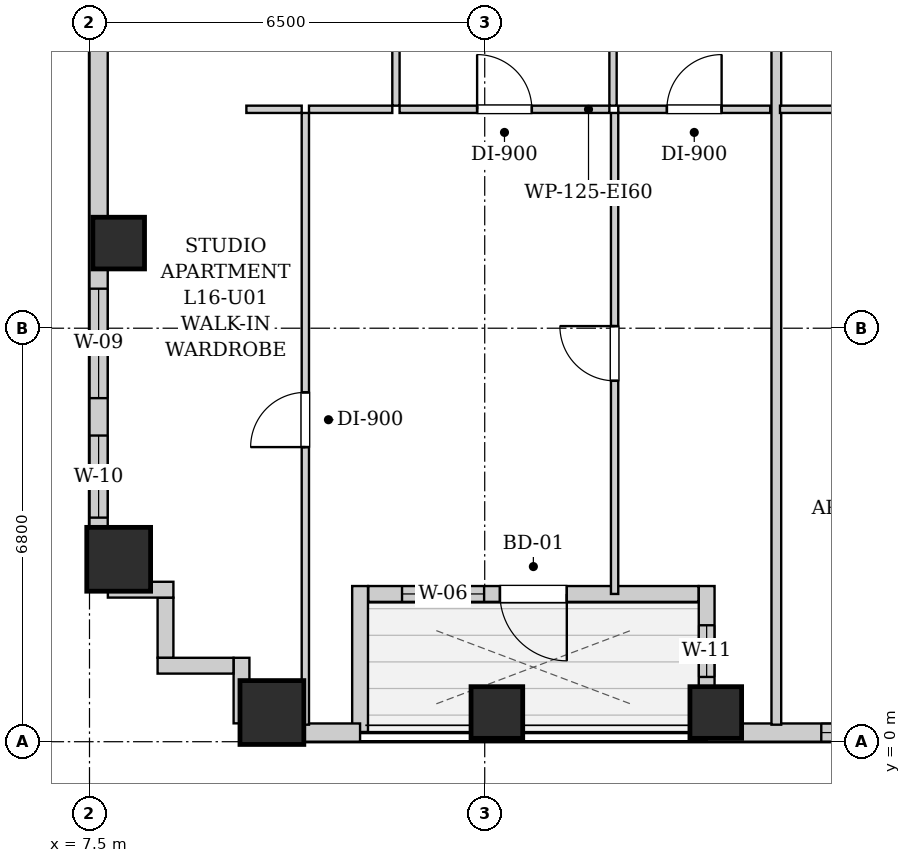
"""IFC4 building model, lengths in metres.
Left out: names, types, materials, properties, quantities, classifications, styles, units other than length and angle.
Written with IfcOpenShell. Run it as: python <this file> out.ifc"""

import sys

from ifc_helpers import new_model, si_unit, direction, frame, frame_2d, origin, origin_2d, place, context, subcontext, project, spatial, rectangle, extrude, element, fill, save


model = new_model("IFC4")
c1 = context("Model", 3, precision=1e-05, world=origin(), true_north=direction((0.0, 1.0)))
c2 = subcontext(c1, "Body", "Model", "MODEL_VIEW")
j1 = project(units=[si_unit("LENGTHUNIT", "METRE"), si_unit("PLANEANGLEUNIT", "RADIAN")], contexts=[c1])
p1 = place(None, origin())
s1 = spatial("IfcSite", under=j1, at=p1, CompositionType="ELEMENT")
p2 = place(p1, origin())
s2 = spatial("IfcBuilding", under=s1, at=p2, CompositionType="ELEMENT")
p3 = place(p2, frame((0.0, 0.0, 61.0)))
s3 = spatial("IfcBuildingStorey", under=s2, at=p3, CompositionType="ELEMENT", Elevation=61.0)
p4 = place(p3, frame((10.5, 0.48, 0.0), z_axis=(0.0, 0.0, 1.0), x_axis=(1.0, 0.0, 0.0)))
e1 = element("IfcColumn", 1, at=p4, inside=s3, PredefinedType="COLUMN", context=c2, shape_type="SweptSolid", body=[
    extrude(rectangle(XDim=1.05, YDim=1.05, at=origin_2d()), origin(), (0.0, 0.0, 1.0), 3.2),
])
for number, where, z_axis, x_axis in (
    (2, (14.2, 0.48, 0.0), (0.0, 0.0, 1.0), (1.0, 0.0, 0.0)),
    (3, (17.8, 0.48, 0.0), (0.0, 0.0, 1.0), (1.0, 0.0, 0.0)),
):
    element("IfcColumn", number, at=place(p3, frame(where, z_axis=z_axis, x_axis=x_axis)), inside=s3, PredefinedType="COLUMN", context=c2, shape_type="SweptSolid", body=[
        extrude(rectangle(XDim=0.85, YDim=0.85, at=origin_2d()), origin(), (0.0, 0.0, 1.0), 3.2),
    ])
p5 = place(p3, frame((7.98, 3.0, 0.0), z_axis=(0.0, 0.0, 1.0), x_axis=(1.0, 0.0, 0.0)))
e4 = element("IfcColumn", 4, at=p5, inside=s3, PredefinedType="COLUMN", context=c2, shape_type="SweptSolid", body=[
    extrude(rectangle(XDim=1.05, YDim=1.05, at=origin_2d()), origin(), (0.0, 0.0, 1.0), 3.2),
])
p6 = place(p3, frame((7.98, 8.2, 0.0), z_axis=(0.0, 0.0, 1.0), x_axis=(1.0, 0.0, 0.0)))
e5 = element("IfcColumn", 5, at=p6, inside=s3, PredefinedType="COLUMN", context=c2, shape_type="SweptSolid", body=[
    extrude(rectangle(XDim=0.85, YDim=0.85, at=origin_2d()), origin(), (0.0, 0.0, 1.0), 3.2),
])
p7 = place(p3, frame((44.0, 0.15, 0.0), z_axis=(0.0, 0.0, 1.0), x_axis=(-1.0, 0.0, 0.0)))
e6 = element("IfcWall", 6, at=p7, inside=s3, PredefinedType="SOLIDWALL", context=c2, shape_type="SweptSolid", body=[
    extrude(rectangle(XDim=26.35, YDim=0.3, at=frame_2d((13.175, 0.0))), origin(), (0.0, 0.0, 1.0), 1.975),
])
p8 = place(p7, frame((22.665, 0.0, 0.55)))
e7 = element("IfcOpeningElement", 7, at=p8, cuts=e6, PredefinedType="OPENING", context=c2, shape_type="SweptSolid", body=[
    extrude(rectangle(XDim=1.8, YDim=1.2, at=frame_2d((0.9, 0.6))), frame((0.0, 0.16, 0.0), z_axis=(0.0, -1.0, 0.0), x_axis=(1.0, 0.0, 0.0)), (0.0, 0.0, 1.0), 0.32),
])
p9 = place(p7, frame((15.82, 0.0, 0.55)))
e8 = element("IfcOpeningElement", 8, at=p9, cuts=e6, PredefinedType="OPENING", context=c2, shape_type="SweptSolid", body=[
    extrude(rectangle(XDim=0.68, YDim=1.2, at=frame_2d((0.34, 0.6))), frame((0.0, 0.16, 0.0), z_axis=(0.0, -1.0, 0.0), x_axis=(1.0, 0.0, 0.0)), (0.0, 0.0, 1.0), 0.32),
])
p10 = place(p7, frame((13.027, 0.0, 0.55)))
e9 = element("IfcOpeningElement", 9, at=p10, cuts=e6, PredefinedType="OPENING", context=c2, shape_type="SweptSolid", body=[
    extrude(rectangle(XDim=1.8, YDim=1.2, at=frame_2d((0.9, 0.6))), frame((0.0, 0.16, 0.0), z_axis=(0.0, -1.0, 0.0), x_axis=(1.0, 0.0, 0.0)), (0.0, 0.0, 1.0), 0.32),
])
p11 = place(p7, frame((9.365, 0.0, 0.55)))
e10 = element("IfcOpeningElement", 10, at=p11, cuts=e6, PredefinedType="OPENING", context=c2, shape_type="SweptSolid", body=[
    extrude(rectangle(XDim=0.85, YDim=1.2, at=frame_2d((0.425, 0.6))), frame((0.0, 0.16, 0.0), z_axis=(0.0, -1.0, 0.0), x_axis=(1.0, 0.0, 0.0)), (0.0, 0.0, 1.0), 0.32),
])
p12 = place(p7, frame((6.553, 0.0, 0.55)))
e11 = element("IfcOpeningElement", 11, at=p12, cuts=e6, PredefinedType="OPENING", context=c2, shape_type="SweptSolid", body=[
    extrude(rectangle(XDim=1.8, YDim=1.2, at=frame_2d((0.9, 0.6))), frame((0.0, 0.16, 0.0), z_axis=(0.0, -1.0, 0.0), x_axis=(1.0, 0.0, 0.0)), (0.0, 0.0, 1.0), 0.32),
])
p13 = place(p7, frame((2.262, 0.0, 0.55)))
e12 = element("IfcOpeningElement", 12, at=p13, cuts=e6, PredefinedType="OPENING", context=c2, shape_type="SweptSolid", body=[
    extrude(rectangle(XDim=1.8, YDim=1.2, at=frame_2d((0.9, 0.6))), frame((0.0, 0.16, 0.0), z_axis=(0.0, -1.0, 0.0), x_axis=(1.0, 0.0, 0.0)), (0.0, 0.0, 1.0), 0.32),
])
p14 = place(p3, frame((17.65, 0.16, 0.0), z_axis=(0.0, 0.0, 1.0), x_axis=(0.0, 1.0, 0.0)))
e13 = element("IfcWall", 13, at=p14, inside=s3, PredefinedType="SOLIDWALL", context=c2, shape_type="SweptSolid", body=[
    extrude(rectangle(XDim=2.4, YDim=0.26, at=frame_2d((1.2, 0.0))), origin(), (0.0, 0.0, 1.0), 2.94),
])
p15 = place(p14, frame((0.905, 0.0, 0.55)))
e14 = element("IfcOpeningElement", 14, at=p15, cuts=e13, PredefinedType="OPENING", context=c2, shape_type="SweptSolid", body=[
    extrude(rectangle(XDim=0.85, YDim=1.2, at=frame_2d((0.425, 0.6))), frame((0.0, 0.14, 0.0), z_axis=(0.0, -1.0, 0.0), x_axis=(1.0, 0.0, 0.0)), (0.0, 0.0, 1.0), 0.28),
])
p16 = place(p3, frame((17.516, 2.43, 0.0), z_axis=(0.0, 0.0, 1.0), x_axis=(-1.0, 0.0, 0.0)))
e15 = element("IfcWall", 15, at=p16, inside=s3, PredefinedType="SOLIDWALL", context=c2, shape_type="SweptSolid", body=[
    extrude(rectangle(XDim=5.432, YDim=0.26, at=frame_2d((2.716, 0.0))), origin(), (0.0, 0.0, 1.0), 2.94),
])
p17 = place(p16, frame((2.166, 0.0, 0.0)))
e16 = element("IfcOpeningElement", 16, at=p17, cuts=e15, PredefinedType="OPENING", context=c2, shape_type="SweptSolid", body=[
    extrude(rectangle(XDim=1.1, YDim=2.0, at=frame_2d((0.55, 1.0))), frame((0.0, 0.14, 0.0), z_axis=(0.0, -1.0, 0.0), x_axis=(1.0, 0.0, 0.0)), (0.0, 0.0, 1.0), 0.28),
])
p18 = place(p16, frame((3.526, 0.0, 0.85)))
e17 = element("IfcOpeningElement", 17, at=p18, cuts=e15, PredefinedType="OPENING", context=c2, shape_type="SweptSolid", body=[
    extrude(rectangle(XDim=1.35, YDim=1.65, at=frame_2d((0.675, 0.825))), frame((0.0, 0.14, 0.0), z_axis=(0.0, -1.0, 0.0), x_axis=(1.0, 0.0, 0.0)), (0.0, 0.0, 1.0), 0.28),
])
p19 = place(p3, frame((11.95, 2.56, 0.0), z_axis=(0.0, 0.0, 1.0), x_axis=(0.0, -1.0, 0.0)))
e18 = element("IfcWall", 18, at=p19, inside=s3, PredefinedType="SOLIDWALL", context=c2, shape_type="SweptSolid", body=[
    extrude(rectangle(XDim=2.4, YDim=0.26, at=frame_2d((1.2, 0.0))), origin(), (0.0, 0.0, 1.0), 2.94),
])
p20 = place(p3, frame((11.95, 0.15, 0.0), z_axis=(0.0, 0.0, 1.0), x_axis=(-1.0, 0.0, 0.0)))
e19 = element("IfcWall", 19, at=p20, inside=s3, PredefinedType="SOLIDWALL", context=c2, shape_type="SweptSolid", body=[
    extrude(rectangle(XDim=1.95, YDim=0.3, at=frame_2d((0.975, 0.0))), origin(), (0.0, 0.0, 1.0), 1.975),
])
p21 = place(p3, frame((7.65, 2.5, 0.0), z_axis=(0.0, 0.0, 1.0), x_axis=(0.0, 1.0, 0.0)))
e20 = element("IfcWall", 20, at=p21, inside=s3, PredefinedType="SOLIDWALL", context=c2, shape_type="SweptSolid", body=[
    extrude(rectangle(XDim=42.6, YDim=0.3, at=frame_2d((21.3, 0.0))), origin(), (0.0, 0.0, 1.0), 1.975),
])
p22 = place(p21, frame((3.15, 0.0, 0.55)))
e21 = element("IfcOpeningElement", 21, at=p22, cuts=e20, PredefinedType="OPENING", context=c2, shape_type="SweptSolid", body=[
    extrude(rectangle(XDim=1.8, YDim=1.2, at=frame_2d((0.9, 0.6))), frame((0.0, 0.16, 0.0), z_axis=(0.0, -1.0, 0.0), x_axis=(1.0, 0.0, 0.0)), (0.0, 0.0, 1.0), 0.32),
])
p23 = place(p21, frame((1.185, 0.0, 0.55)))
e22 = element("IfcOpeningElement", 22, at=p23, cuts=e20, PredefinedType="OPENING", context=c2, shape_type="SweptSolid", body=[
    extrude(rectangle(XDim=1.35, YDim=1.2, at=frame_2d((0.675, 0.6))), frame((0.0, 0.16, 0.0), z_axis=(0.0, -1.0, 0.0), x_axis=(1.0, 0.0, 0.0)), (0.0, 0.0, 1.0), 0.32),
])
p24 = place(p21, frame((37.085, 0.0, 0.55)))
e23 = element("IfcOpeningElement", 23, at=p24, cuts=e20, PredefinedType="OPENING", context=c2, shape_type="SweptSolid", body=[
    extrude(rectangle(XDim=1.8, YDim=1.2, at=frame_2d((0.9, 0.6))), frame((0.0, 0.16, 0.0), z_axis=(0.0, -1.0, 0.0), x_axis=(1.0, 0.0, 0.0)), (0.0, 0.0, 1.0), 0.32),
])
p25 = place(p21, frame((31.55, 0.0, 0.55)))
e24 = element("IfcOpeningElement", 24, at=p25, cuts=e20, PredefinedType="OPENING", context=c2, shape_type="SweptSolid", body=[
    extrude(rectangle(XDim=1.35, YDim=1.2, at=frame_2d((0.675, 0.6))), frame((0.0, 0.16, 0.0), z_axis=(0.0, -1.0, 0.0), x_axis=(1.0, 0.0, 0.0)), (0.0, 0.0, 1.0), 0.32),
])
p26 = place(p21, frame((15.2, 0.0, 0.55)))
e25 = element("IfcOpeningElement", 25, at=p26, cuts=e20, PredefinedType="OPENING", context=c2, shape_type="SweptSolid", body=[
    extrude(rectangle(XDim=1.8, YDim=1.2, at=frame_2d((0.9, 0.6))), frame((0.0, 0.16, 0.0), z_axis=(0.0, -1.0, 0.0), x_axis=(1.0, 0.0, 0.0)), (0.0, 0.0, 1.0), 0.32),
])
p27 = place(p21, frame((13.085, 0.0, 0.55)))
e26 = element("IfcOpeningElement", 26, at=p27, cuts=e20, PredefinedType="OPENING", context=c2, shape_type="SweptSolid", body=[
    extrude(rectangle(XDim=1.35, YDim=1.2, at=frame_2d((0.675, 0.6))), frame((0.0, 0.16, 0.0), z_axis=(0.0, -1.0, 0.0), x_axis=(1.0, 0.0, 0.0)), (0.0, 0.0, 1.0), 0.32),
])
p28 = place(p21, frame((22.575, 0.0, 0.55)))
e27 = element("IfcOpeningElement", 27, at=p28, cuts=e20, PredefinedType="OPENING", context=c2, shape_type="SweptSolid", body=[
    extrude(rectangle(XDim=1.8, YDim=1.2, at=frame_2d((0.9, 0.6))), frame((0.0, 0.16, 0.0), z_axis=(0.0, -1.0, 0.0), x_axis=(1.0, 0.0, 0.0)), (0.0, 0.0, 1.0), 0.32),
])
p29 = place(p3, frame((10.0, 0.302, 0.0), z_axis=(0.0, 0.0, 1.0), x_axis=(0.0, 1.0, 0.0)))
e28 = element("IfcWall", 28, at=p29, inside=s3, PredefinedType="SOLIDWALL", context=c2, shape_type="SweptSolid", body=[
    extrude(rectangle(XDim=1.078, YDim=0.26, at=frame_2d((0.539, 0.0))), origin(), (0.0, 0.0, 1.0), 2.94),
])
p30 = place(p3, frame((9.868, 1.25, 0.0), z_axis=(0.0, 0.0, 1.0), x_axis=(-1.0, 0.0, 0.0)))
e29 = element("IfcWall", 29, at=p30, inside=s3, PredefinedType="SOLIDWALL", context=c2, shape_type="SweptSolid", body=[
    extrude(rectangle(XDim=1.248, YDim=0.26, at=frame_2d((0.624, 0.0))), origin(), (0.0, 0.0, 1.0), 2.94),
])
p31 = place(p3, frame((8.75, 1.382, 0.0), z_axis=(0.0, 0.0, 1.0), x_axis=(0.0, 1.0, 0.0)))
e30 = element("IfcWall", 30, at=p31, inside=s3, PredefinedType="SOLIDWALL", context=c2, shape_type="SweptSolid", body=[
    extrude(rectangle(XDim=0.986, YDim=0.26, at=frame_2d((0.493, 0.0))), origin(), (0.0, 0.0, 1.0), 2.94),
])
p32 = place(p3, frame((8.88, 2.5, 0.0), z_axis=(0.0, 0.0, 1.0), x_axis=(-1.0, 0.0, 0.0)))
e31 = element("IfcWall", 31, at=p32, inside=s3, PredefinedType="SOLIDWALL", context=c2, shape_type="SweptSolid", body=[
    extrude(rectangle(XDim=1.078, YDim=0.26, at=frame_2d((0.539, 0.0))), origin(), (0.0, 0.0, 1.0), 2.94),
])
p33 = place(p3, frame((12.54, 10.46, 0.0), z_axis=(0.0, 0.0, 1.0), x_axis=(0.0, 1.0, 0.0)))
e32 = element("IfcWall", 32, at=p33, inside=s3, PredefinedType="PARTITIONING", context=c2, shape_type="SweptSolid", body=[
    extrude(rectangle(XDim=2.85, YDim=0.12, at=frame_2d((1.425, 0.0))), origin(), (0.0, 0.0, 1.0), 2.94),
])
p34 = place(p33, frame((0.995, 0.0, 0.0)))
e33 = element("IfcOpeningElement", 33, at=p34, cuts=e32, PredefinedType="OPENING", context=c2, shape_type="SweptSolid", body=[
    extrude(rectangle(XDim=0.86, YDim=2.05, at=frame_2d((0.43, 1.025))), frame((0.0, 0.07, 0.0), z_axis=(0.0, -1.0, 0.0), x_axis=(1.0, 0.0, 0.0)), (0.0, 0.0, 1.0), 0.14),
])
p35 = place(p3, frame((10.08, 10.4, 0.0), z_axis=(0.0, 0.0, 1.0), x_axis=(1.0, 0.0, 0.0)))
e34 = element("IfcWall", 34, at=p35, inside=s3, PredefinedType="PARTITIONING", context=c2, shape_type="SweptSolid", body=[
    extrude(rectangle(XDim=0.91, YDim=0.12, at=frame_2d((0.455, 0.0))), origin(), (0.0, 0.0, 1.0), 2.94),
])
p36 = place(p3, frame((11.11, 10.4, 0.0), z_axis=(0.0, 0.0, 1.0), x_axis=(1.0, 0.0, 0.0)))
e35 = element("IfcWall", 35, at=p36, inside=s3, PredefinedType="PARTITIONING", context=c2, shape_type="SweptSolid", body=[
    extrude(rectangle(XDim=1.37, YDim=0.12, at=frame_2d((0.685, 0.0))), origin(), (0.0, 0.0, 1.0), 2.94),
])
p37 = place(p3, frame((16.11, 10.46, 0.0), z_axis=(0.0, 0.0, 1.0), x_axis=(0.0, 1.0, 0.0)))
e36 = element("IfcWall", 36, at=p37, inside=s3, PredefinedType="PARTITIONING", context=c2, shape_type="SweptSolid", body=[
    extrude(rectangle(XDim=2.85, YDim=0.12, at=frame_2d((1.425, 0.0))), origin(), (0.0, 0.0, 1.0), 2.94),
])
p38 = place(p37, frame((0.975, 0.0, 0.0)))
e37 = element("IfcOpeningElement", 37, at=p38, cuts=e36, PredefinedType="OPENING", context=c2, shape_type="SweptSolid", body=[
    extrude(rectangle(XDim=0.9, YDim=2.05, at=frame_2d((0.45, 1.025))), frame((0.0, 0.07, 0.0), z_axis=(0.0, -1.0, 0.0), x_axis=(1.0, 0.0, 0.0)), (0.0, 0.0, 1.0), 0.14),
])
p39 = place(p3, frame((12.6, 10.4, 0.0), z_axis=(0.0, 0.0, 1.0), x_axis=(1.0, 0.0, 0.0)))
e38 = element("IfcWall", 38, at=p39, inside=s3, PredefinedType="PARTITIONING", context=c2, shape_type="SweptSolid", body=[
    extrude(rectangle(XDim=3.45, YDim=0.12, at=frame_2d((1.725, 0.0))), origin(), (0.0, 0.0, 1.0), 2.94),
])
p40 = place(p39, frame((1.275, 0.0, 0.0)))
e39 = element("IfcOpeningElement", 39, at=p40, cuts=e38, PredefinedType="OPENING", context=c2, shape_type="SweptSolid", body=[
    extrude(rectangle(XDim=0.9, YDim=2.05, at=frame_2d((0.45, 1.025))), frame((0.0, 0.07, 0.0), z_axis=(0.0, -1.0, 0.0), x_axis=(1.0, 0.0, 0.0)), (0.0, 0.0, 1.0), 0.14),
])
p41 = place(p3, frame((16.196, 10.4, 0.0), z_axis=(0.0, 0.0, 1.0), x_axis=(1.0, 0.0, 0.0)))
e40 = element("IfcWall", 40, at=p41, inside=s3, PredefinedType="PARTITIONING", context=c2, shape_type="SweptSolid", body=[
    extrude(rectangle(XDim=2.5, YDim=0.12, at=frame_2d((1.25, 0.0))), origin(), (0.0, 0.0, 1.0), 2.94),
])
p42 = place(p41, frame((0.8, 0.0, 0.0)))
e41 = element("IfcOpeningElement", 41, at=p42, cuts=e40, PredefinedType="OPENING", context=c2, shape_type="SweptSolid", body=[
    extrude(rectangle(XDim=0.9, YDim=2.05, at=frame_2d((0.45, 1.025))), frame((0.0, 0.07, 0.0), z_axis=(0.0, -1.0, 0.0), x_axis=(1.0, 0.0, 0.0)), (0.0, 0.0, 1.0), 0.14),
])
p43 = place(p3, frame((11.05, 0.28, 0.0), z_axis=(0.0, 0.0, 1.0), x_axis=(0.0, 1.0, 0.0)))
e42 = element("IfcWall", 42, at=p43, inside=s3, PredefinedType="PARTITIONING", context=c2, shape_type="SweptSolid", body=[
    extrude(rectangle(XDim=10.06, YDim=0.12, at=frame_2d((5.03, 0.0))), origin(), (0.0, 0.0, 1.0), 2.94),
])
p44 = place(p43, frame((4.565, 0.0, 0.0)))
e43 = element("IfcOpeningElement", 43, at=p44, cuts=e42, PredefinedType="OPENING", context=c2, shape_type="SweptSolid", body=[
    extrude(rectangle(XDim=0.9, YDim=2.05, at=frame_2d((0.45, 1.025))), frame((0.0, 0.07, 0.0), z_axis=(0.0, -1.0, 0.0), x_axis=(1.0, 0.0, 0.0)), (0.0, 0.0, 1.0), 0.14),
])
p45 = place(p3, frame((16.136, 2.43, 0.0), z_axis=(0.0, 0.0, 1.0), x_axis=(0.0, 1.0, 0.0)))
e44 = element("IfcWall", 44, at=p45, inside=s3, PredefinedType="PARTITIONING", context=c2, shape_type="SweptSolid", body=[
    extrude(rectangle(XDim=7.91, YDim=0.12, at=frame_2d((3.955, 0.0))), origin(), (0.0, 0.0, 1.0), 2.94),
])
p46 = place(p45, frame((3.505, 0.0, 0.0)))
e45 = element("IfcOpeningElement", 45, at=p46, cuts=e44, PredefinedType="OPENING", context=c2, shape_type="SweptSolid", body=[
    extrude(rectangle(XDim=0.9, YDim=2.05, at=frame_2d((0.45, 1.025))), frame((0.0, 0.07, 0.0), z_axis=(0.0, -1.0, 0.0), x_axis=(1.0, 0.0, 0.0)), (0.0, 0.0, 1.0), 0.14),
])
p47 = place(p3, frame((18.796, 0.28, 0.0), z_axis=(0.0, 0.0, 1.0), x_axis=(0.0, 1.0, 0.0)))
e46 = element("IfcWall", 46, at=p47, inside=s3, PredefinedType="PARTITIONING", context=c2, shape_type="SweptSolid", body=[
    extrude(rectangle(XDim=13.03, YDim=0.16, at=frame_2d((6.515, 0.0))), origin(), (0.0, 0.0, 1.0), 2.94),
])
p48 = place(p3, frame((18.856, 10.4, 0.0), z_axis=(0.0, 0.0, 1.0), x_axis=(1.0, 0.0, 0.0)))
e47 = element("IfcWall", 47, at=p48, inside=s3, PredefinedType="PARTITIONING", context=c2, shape_type="SweptSolid", body=[
    extrude(rectangle(XDim=2.4, YDim=0.12, at=frame_2d((1.2, 0.0))), origin(), (0.0, 0.0, 1.0), 2.94),
])
p49 = place(p40, origin())
e48 = element("IfcDoor", 48, at=p49, inside=s3, OperationType="SINGLE_SWING_LEFT", PredefinedType="DOOR", context=c2, shape_type="SweptSolid", body=[
    extrude(rectangle(XDim=0.9, YDim=2.05, at=frame_2d((0.45, 1.025))), frame((0.0, 0.025, 0.0), z_axis=(0.0, -1.0, 0.0), x_axis=(1.0, 0.0, 0.0)), (0.0, 0.0, 1.0), 0.05),
])
fill(e39, e48)
p50 = place(p42, origin())
e49 = element("IfcDoor", 49, at=p50, inside=s3, OperationType="SINGLE_SWING_RIGHT", PredefinedType="DOOR", context=c2, shape_type="SweptSolid", body=[
    extrude(rectangle(XDim=0.9, YDim=2.05, at=frame_2d((0.45, 1.025))), frame((0.0, 0.025, 0.0), z_axis=(0.0, -1.0, 0.0), x_axis=(1.0, 0.0, 0.0)), (0.0, 0.0, 1.0), 0.05),
])
fill(e41, e49)
p51 = place(p44, origin())
e50 = element("IfcDoor", 50, at=p51, inside=s3, OperationType="SINGLE_SWING_LEFT", PredefinedType="DOOR", context=c2, shape_type="SweptSolid", body=[
    extrude(rectangle(XDim=0.9, YDim=2.05, at=frame_2d((0.45, 1.025))), frame((0.0, 0.025, 0.0), z_axis=(0.0, -1.0, 0.0), x_axis=(1.0, 0.0, 0.0)), (0.0, 0.0, 1.0), 0.05),
])
fill(e43, e50)
p52 = place(p46, origin())
e51 = element("IfcDoor", 51, at=p52, inside=s3, OperationType="SINGLE_SWING_RIGHT", PredefinedType="DOOR", context=c2, shape_type="SweptSolid", body=[
    extrude(rectangle(XDim=0.9, YDim=2.05, at=frame_2d((0.45, 1.025))), frame((0.0, 0.025, 0.0), z_axis=(0.0, -1.0, 0.0), x_axis=(1.0, 0.0, 0.0)), (0.0, 0.0, 1.0), 0.05),
])
fill(e45, e51)
p53 = place(p17, origin())
e52 = element("IfcDoor", 52, at=p53, inside=s3, OperationType="SINGLE_SWING_LEFT", PredefinedType="DOOR", context=c2, shape_type="SweptSolid", body=[
    extrude(rectangle(XDim=1.1, YDim=2.0, at=frame_2d((0.55, 1.0))), frame((0.0, 0.025, 0.0), z_axis=(0.0, -1.0, 0.0), x_axis=(1.0, 0.0, 0.0)), (0.0, 0.0, 1.0), 0.05),
])
fill(e16, e52)
p54 = place(p22, origin())
e53 = element("IfcWindow", 53, at=p54, inside=s3, PartitioningType="DOUBLE_PANEL_VERTICAL", PredefinedType="WINDOW", context=c2, shape_type="SweptSolid", body=[
    extrude(rectangle(XDim=1.8, YDim=1.2, at=frame_2d((0.9, 0.6))), frame((0.0, 0.03, 0.0), z_axis=(0.0, -1.0, 0.0), x_axis=(1.0, 0.0, 0.0)), (0.0, 0.0, 1.0), 0.06),
])
fill(e21, e53)
p55 = place(p23, origin())
e54 = element("IfcWindow", 54, at=p55, inside=s3, PartitioningType="SINGLE_PANEL", PredefinedType="WINDOW", context=c2, shape_type="SweptSolid", body=[
    extrude(rectangle(XDim=1.35, YDim=1.2, at=frame_2d((0.675, 0.6))), frame((0.0, 0.03, 0.0), z_axis=(0.0, -1.0, 0.0), x_axis=(1.0, 0.0, 0.0)), (0.0, 0.0, 1.0), 0.06),
])
fill(e22, e54)
p56 = place(p18, origin())
e55 = element("IfcWindow", 55, at=p56, inside=s3, PartitioningType="SINGLE_PANEL", PredefinedType="WINDOW", context=c2, shape_type="SweptSolid", body=[
    extrude(rectangle(XDim=1.35, YDim=1.65, at=frame_2d((0.675, 0.825))), frame((0.0, 0.03, 0.0), z_axis=(0.0, -1.0, 0.0), x_axis=(1.0, 0.0, 0.0)), (0.0, 0.0, 1.0), 0.06),
])
fill(e17, e55)
p57 = place(p15, origin())
e56 = element("IfcWindow", 56, at=p57, inside=s3, PartitioningType="SINGLE_PANEL", PredefinedType="WINDOW", context=c2, shape_type="SweptSolid", body=[
    extrude(rectangle(XDim=0.85, YDim=1.2, at=frame_2d((0.425, 0.6))), frame((0.0, 0.03, 0.0), z_axis=(0.0, -1.0, 0.0), x_axis=(1.0, 0.0, 0.0)), (0.0, 0.0, 1.0), 0.06),
])
fill(e14, e56)
p58 = place(p8, origin())
e57 = element("IfcWindow", 57, at=p58, inside=s3, PartitioningType="DOUBLE_PANEL_VERTICAL", PredefinedType="WINDOW", context=c2, shape_type="SweptSolid", body=[
    extrude(rectangle(XDim=1.8, YDim=1.2, at=frame_2d((0.9, 0.6))), frame((0.0, 0.03, 0.0), z_axis=(0.0, -1.0, 0.0), x_axis=(1.0, 0.0, 0.0)), (0.0, 0.0, 1.0), 0.06),
])
fill(e7, e57)
save(model, sys.argv[1])
